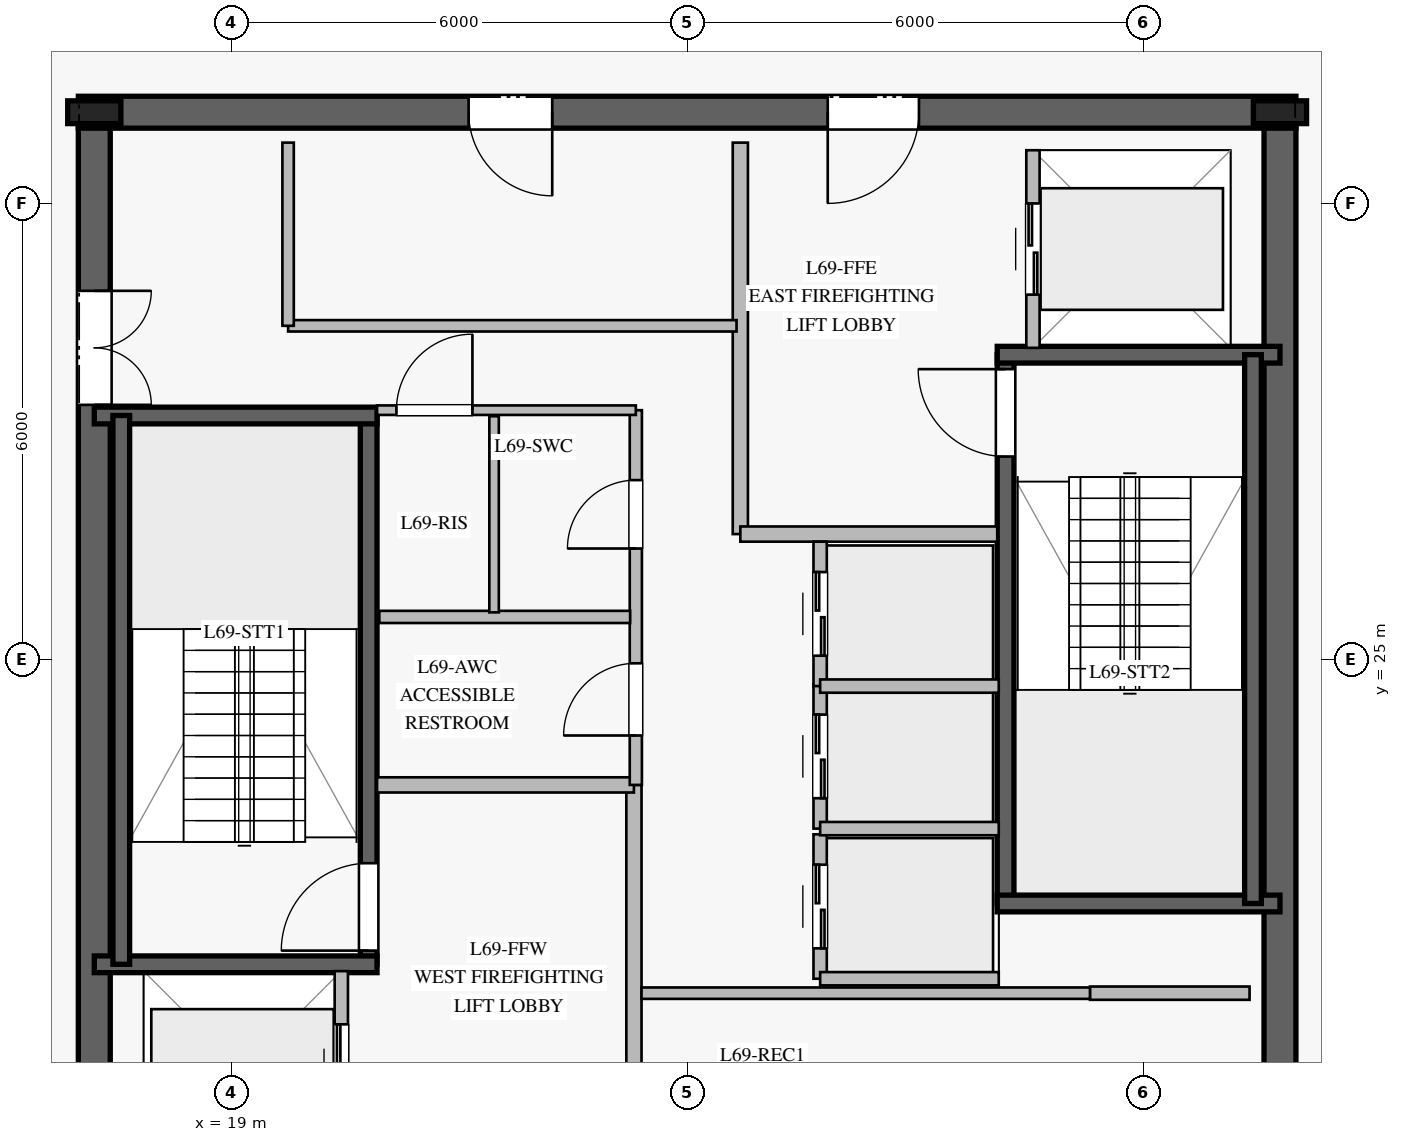
"""IFC4 building model, lengths in metres.
Left out: names, types, materials, properties, quantities, classifications, styles, units other than length and angle.
Written with IfcOpenShell. Run it as: python <this file> out.ifc"""

import sys

from ifc_helpers import new_model, si_unit, direction, frame, frame_2d, origin, origin_2d, place, context, subcontext, project, spatial, rectangle, i_section, extrude, element, fill, save


model = new_model("IFC4")
c1 = context("Model", 3, precision=1e-05, world=origin(), true_north=direction((0.0, 1.0)))
c2 = subcontext(c1, "Body", "Model", "MODEL_VIEW")
j1 = project(units=[si_unit("LENGTHUNIT", "METRE"), si_unit("PLANEANGLEUNIT", "RADIAN")], contexts=[c1])
p1 = place(None, origin())
s1 = spatial("IfcSite", under=j1, at=p1, CompositionType="ELEMENT")
p2 = place(p1, origin())
s2 = spatial("IfcBuilding", under=s1, at=p2, CompositionType="ELEMENT")
p3 = place(p2, frame((0.0, 0.0, 286.2)))
s3 = spatial("IfcBuildingStorey", under=s2, at=p3, CompositionType="ELEMENT", Elevation=286.2)
p4 = place(p3, frame((33.01, 32.2, 0.0), z_axis=(0.0, 0.0, 1.0), x_axis=(-1.0, 0.0, 0.0)))
e1 = element("IfcWall", 1, at=p4, inside=s3, PredefinedType="SHEAR", context=c2, shape_type="SweptSolid", body=[
    extrude(rectangle(XDim=16.02, YDim=0.42, at=frame_2d((8.01, 0.0))), origin(), (0.0, 0.0, 1.0), 3.78),
])
p5 = place(p4, frame((4.96, 0.0, 0.0)))
e2 = element("IfcOpeningElement", 2, at=p5, cuts=e1, PredefinedType="OPENING", context=c2, shape_type="SweptSolid", body=[
    extrude(rectangle(XDim=1.2, YDim=2.25, at=frame_2d((0.6, 1.125))), frame((0.0, 0.22, 0.0), z_axis=(0.0, -1.0, 0.0), x_axis=(1.0, 0.0, 0.0)), (0.0, 0.0, 1.0), 0.44),
])
p6 = place(p4, frame((9.785, 0.0, 0.0)))
e3 = element("IfcOpeningElement", 3, at=p6, cuts=e1, PredefinedType="OPENING", context=c2, shape_type="SweptSolid", body=[
    extrude(rectangle(XDim=1.1, YDim=2.2, at=frame_2d((0.55, 1.1))), frame((0.0, 0.22, 0.0), z_axis=(0.0, -1.0, 0.0), x_axis=(1.0, 0.0, 0.0)), (0.0, 0.0, 1.0), 0.44),
])
p7 = place(p3, frame((17.2, 31.99, 0.0), z_axis=(0.0, 0.0, 1.0), x_axis=(0.0, -1.0, 0.0)))
e4 = element("IfcWall", 4, at=p7, inside=s3, PredefinedType="SHEAR", context=c2, shape_type="SweptSolid", body=[
    extrude(rectangle(XDim=13.98, YDim=0.42, at=frame_2d((6.99, 0.0))), origin(), (0.0, 0.0, 1.0), 3.78),
])
p8 = place(p7, frame((2.14, 0.0, 0.0)))
e5 = element("IfcOpeningElement", 5, at=p8, cuts=e4, PredefinedType="OPENING", context=c2, shape_type="SweptSolid", body=[
    extrude(rectangle(XDim=1.5, YDim=2.2, at=frame_2d((0.75, 1.1))), frame((0.0, 0.22, 0.0), z_axis=(0.0, -1.0, 0.0), x_axis=(1.0, 0.0, 0.0)), (0.0, 0.0, 1.0), 0.44),
])
p9 = place(p3, frame((32.8, 18.01, 0.0), z_axis=(0.0, 0.0, 1.0), x_axis=(0.0, 1.0, 0.0)))
e6 = element("IfcWall", 6, at=p9, inside=s3, PredefinedType="SHEAR", context=c2, shape_type="SweptSolid", body=[
    extrude(rectangle(XDim=13.98, YDim=0.42, at=frame_2d((6.99, 0.0))), origin(), (0.0, 0.0, 1.0), 3.78),
])
for number, where, z_axis, x_axis in (
    (7, (32.8, 32.2, 0.0), (0.0, 0.0, 1.0), (1.0, 0.0, 0.0)),
    (8, (17.2, 32.2, 0.0), (0.0, 0.0, 1.0), (1.0, 0.0, 0.0)),
):
    element("IfcColumn", number, at=place(p3, frame(where, z_axis=z_axis, x_axis=x_axis)), inside=s3, PredefinedType="COLUMN", context=c2, shape_type="SweptSolid", body=[
        extrude(i_section(OverallWidth=0.3, OverallDepth=0.7, WebThickness=0.017, FlangeThickness=0.032, at=origin_2d()), origin(), (0.0, 0.0, 1.0), 4.0),
    ])
p10 = place(p3, frame((20.81, 20.99, 0.0), z_axis=(0.0, 0.0, 1.0), x_axis=(0.0, 1.0, 0.0)))
e9 = element("IfcWall", 9, at=p10, inside=s3, PredefinedType="SOLIDWALL", context=c2, shape_type="SweptSolid", body=[
    extrude(rectangle(XDim=7.22, YDim=0.22, at=frame_2d((3.61, 0.0))), origin(), (0.0, 0.0, 1.0), 3.78),
])
p11 = place(p10, frame((0.18, 0.0, 0.0)))
e10 = element("IfcOpeningElement", 10, at=p11, cuts=e9, PredefinedType="OPENING", context=c2, shape_type="SweptSolid", body=[
    extrude(rectangle(XDim=1.15, YDim=2.2, at=frame_2d((0.575, 1.1))), frame((0.0, 0.12, 0.0), z_axis=(0.0, -1.0, 0.0), x_axis=(1.0, 0.0, 0.0)), (0.0, 0.0, 1.0), 0.24),
])
for number, where, z_axis, x_axis in (
    (11, (17.2, 20.99, 0.0), (0.0, 0.0, 1.0), (1.0, 0.0, 0.0)),
    (12, (17.2, 28.21, 0.0), (0.0, 0.0, 1.0), (1.0, 0.0, 0.0)),
):
    element("IfcWall", number, at=place(p3, frame(where, z_axis=z_axis, x_axis=x_axis)), inside=s3, PredefinedType="SOLIDWALL", context=c2, shape_type="SweptSolid", body=[
        extrude(rectangle(XDim=3.72, YDim=0.22, at=frame_2d((1.86, 0.0))), origin(), (0.0, 0.0, 1.0), 3.78),
    ])
p12 = place(p3, frame((17.555, 28.21, 0.0), z_axis=(0.0, 0.0, 1.0), x_axis=(0.0, -1.0, 0.0)))
e13 = element("IfcWall", 13, at=p12, inside=s3, PredefinedType="SOLIDWALL", context=c2, shape_type="SweptSolid", body=[
    extrude(rectangle(XDim=7.22, YDim=0.22, at=frame_2d((3.61, 0.0))), origin(), (0.0, 0.0, 1.0), 3.78),
])
p13 = place(p3, frame((29.19, 21.79, 0.0), z_axis=(0.0, 0.0, 1.0), x_axis=(0.0, 1.0, 0.0)))
e14 = element("IfcWall", 14, at=p13, inside=s3, PredefinedType="SOLIDWALL", context=c2, shape_type="SweptSolid", body=[
    extrude(rectangle(XDim=7.22, YDim=0.22, at=frame_2d((3.61, 0.0))), origin(), (0.0, 0.0, 1.0), 3.78),
])
p14 = place(p13, frame((5.88, 0.0, 0.0)))
e15 = element("IfcOpeningElement", 15, at=p14, cuts=e14, PredefinedType="OPENING", context=c2, shape_type="SweptSolid", body=[
    extrude(rectangle(XDim=1.15, YDim=2.2, at=frame_2d((0.575, 1.1))), frame((0.0, 0.12, 0.0), z_axis=(0.0, -1.0, 0.0), x_axis=(1.0, 0.0, 0.0)), (0.0, 0.0, 1.0), 0.24),
])
for number, where, z_axis, x_axis in (
    (16, (29.08, 21.79, 0.0), (0.0, 0.0, 1.0), (1.0, 0.0, 0.0)),
    (17, (29.08, 29.01, 0.0), (0.0, 0.0, 1.0), (1.0, 0.0, 0.0)),
):
    element("IfcWall", number, at=place(p3, frame(where, z_axis=z_axis, x_axis=x_axis)), inside=s3, PredefinedType="SOLIDWALL", context=c2, shape_type="SweptSolid", body=[
        extrude(rectangle(XDim=3.72, YDim=0.22, at=frame_2d((1.86, 0.0))), origin(), (0.0, 0.0, 1.0), 3.78),
    ])
p15 = place(p3, frame((32.445, 29.01, 0.0), z_axis=(0.0, 0.0, 1.0), x_axis=(0.0, -1.0, 0.0)))
e18 = element("IfcWall", 18, at=p15, inside=s3, PredefinedType="SOLIDWALL", context=c2, shape_type="SweptSolid", body=[
    extrude(rectangle(XDim=7.22, YDim=0.22, at=frame_2d((3.61, 0.0))), origin(), (0.0, 0.0, 1.0), 3.78),
])
p16 = place(p3, frame((24.3, 18.2, 0.0), z_axis=(0.0, 0.0, 1.0), x_axis=(0.0, 1.0, 0.0)))
e19 = element("IfcWall", 19, at=p16, inside=s3, PredefinedType="PARTITIONING", context=c2, shape_type="SweptSolid", body=[
    extrude(rectangle(XDim=5.15, YDim=0.2, at=frame_2d((2.575, 0.0))), origin(), (0.0, 0.0, 1.0), 3.78),
])
p17 = place(p3, frame((20.92, 23.35, 0.0), z_axis=(0.0, 0.0, 1.0), x_axis=(1.0, 0.0, 0.0)))
e20 = element("IfcWall", 20, at=p17, inside=s3, PredefinedType="PARTITIONING", context=c2, shape_type="SweptSolid", body=[
    extrude(rectangle(XDim=3.38, YDim=0.2, at=frame_2d((1.69, 0.0))), origin(), (0.0, 0.0, 1.0), 3.78),
])
p18 = place(p3, frame((25.7, 26.65, 0.0), z_axis=(0.0, 0.0, 1.0), x_axis=(0.0, 1.0, 0.0)))
e21 = element("IfcWall", 21, at=p18, inside=s3, PredefinedType="PARTITIONING", context=c2, shape_type="SweptSolid", body=[
    extrude(rectangle(XDim=5.15, YDim=0.2, at=frame_2d((2.575, 0.0))), origin(), (0.0, 0.0, 1.0), 3.78),
])
p19 = place(p3, frame((25.7, 26.65, 0.0), z_axis=(0.0, 0.0, 1.0), x_axis=(1.0, 0.0, 0.0)))
e22 = element("IfcWall", 22, at=p19, inside=s3, PredefinedType="PARTITIONING", context=c2, shape_type="SweptSolid", body=[
    extrude(rectangle(XDim=3.38, YDim=0.2, at=frame_2d((1.69, 0.0))), origin(), (0.0, 0.0, 1.0), 3.78),
])
p20 = place(p3, frame((24.325, 23.35, 0.0), z_axis=(0.0, 0.0, 1.0), x_axis=(0.0, 1.0, 0.0)))
e23 = element("IfcWall", 23, at=p20, inside=s3, PredefinedType="PLUMBINGWALL", context=c2, shape_type="SweptSolid", body=[
    extrude(rectangle(XDim=4.93, YDim=0.16, at=frame_2d((2.465, 0.0))), origin(), (0.0, 0.0, 1.0), 3.78),
])
p21 = place(p20, frame((0.65, 0.0, 0.0)))
e24 = element("IfcOpeningElement", 24, at=p21, cuts=e23, PredefinedType="OPENING", context=c2, shape_type="SweptSolid", body=[
    extrude(rectangle(XDim=0.95, YDim=2.1, at=frame_2d((0.475, 1.05))), frame((0.0, 0.09, 0.0), z_axis=(0.0, -1.0, 0.0), x_axis=(1.0, 0.0, 0.0)), (0.0, 0.0, 1.0), 0.18),
])
p22 = place(p20, frame((3.11, 0.0, 0.0)))
e25 = element("IfcOpeningElement", 25, at=p22, cuts=e23, PredefinedType="OPENING", context=c2, shape_type="SweptSolid", body=[
    extrude(rectangle(XDim=0.9, YDim=2.1, at=frame_2d((0.45, 1.05))), frame((0.0, 0.09, 0.0), z_axis=(0.0, -1.0, 0.0), x_axis=(1.0, 0.0, 0.0)), (0.0, 0.0, 1.0), 0.18),
])
p23 = place(p3, frame((20.92, 28.28, 0.0), z_axis=(0.0, 0.0, 1.0), x_axis=(1.0, 0.0, 0.0)))
e26 = element("IfcWall", 26, at=p23, inside=s3, PredefinedType="PARTITIONING", context=c2, shape_type="SweptSolid", body=[
    extrude(rectangle(XDim=3.405, YDim=0.125, at=frame_2d((1.703, 0.0))), origin(), (0.0, 0.0, 1.0), 3.78),
])
p24 = place(p23, frame((0.255, 0.0, 0.0)))
e27 = element("IfcOpeningElement", 27, at=p24, cuts=e26, PredefinedType="OPENING", context=c2, shape_type="SweptSolid", body=[
    extrude(rectangle(XDim=1.0, YDim=2.15, at=frame_2d((0.5, 1.075))), frame((0.0, 0.073, 0.0), z_axis=(0.0, -1.0, 0.0), x_axis=(1.0, 0.0, 0.0)), (0.0, 0.0, 1.0), 0.145),
])
p25 = place(p3, frame((20.95, 25.56, 0.0), z_axis=(0.0, 0.0, 1.0), x_axis=(1.0, 0.0, 0.0)))
e28 = element("IfcWall", 28, at=p25, inside=s3, PredefinedType="PLUMBINGWALL", context=c2, shape_type="SweptSolid", body=[
    extrude(rectangle(XDim=3.3, YDim=0.16, at=frame_2d((1.65, 0.0))), origin(), (0.0, 0.0, 1.0), 3.78),
])
p26 = place(p3, frame((22.46, 25.62, 0.0), z_axis=(0.0, 0.0, 1.0), x_axis=(0.0, 1.0, 0.0)))
e29 = element("IfcWall", 29, at=p26, inside=s3, PredefinedType="PARTITIONING", context=c2, shape_type="SweptSolid", body=[
    extrude(rectangle(XDim=2.58, YDim=0.125, at=frame_2d((1.29, 0.0))), origin(), (0.0, 0.0, 1.0), 3.78),
])
p27 = place(p3, frame((30.3, 20.61, 0.0), z_axis=(0.0, 0.0, 1.0), x_axis=(1.0, 0.0, 0.0)))
e30 = element("IfcWall", 30, at=p27, inside=s3, PredefinedType="PARTITIONING", context=c2, shape_type="SweptSolid", body=[
    extrude(rectangle(XDim=2.1, YDim=0.175, at=frame_2d((1.05, 0.0))), origin(), (0.0, 0.0, 1.0), 3.78),
])
p28 = place(p3, frame((24.4, 20.61, 0.0), z_axis=(0.0, 0.0, 1.0), x_axis=(1.0, 0.0, 0.0)))
e31 = element("IfcWall", 31, at=p28, inside=s3, PredefinedType="PARTITIONING", context=c2, shape_type="SweptSolid", body=[
    extrude(rectangle(XDim=5.9, YDim=0.15, at=frame_2d((2.95, 0.0))), origin(), (0.0, 0.0, 1.0), 3.78),
])
p29 = place(p3, frame((19.75, 29.39, 0.0), z_axis=(0.0, 0.0, 1.0), x_axis=(1.0, 0.0, 0.0)))
e32 = element("IfcWall", 32, at=p29, inside=s3, PredefinedType="PARTITIONING", context=c2, shape_type="SweptSolid", body=[
    extrude(rectangle(XDim=5.9, YDim=0.15, at=frame_2d((2.95, 0.0))), origin(), (0.0, 0.0, 1.0), 3.78),
])
p30 = place(p3, frame((19.75, 29.39, 0.0), z_axis=(0.0, 0.0, 1.0), x_axis=(0.0, 1.0, 0.0)))
e33 = element("IfcWall", 33, at=p30, inside=s3, PredefinedType="PARTITIONING", context=c2, shape_type="SweptSolid", body=[
    extrude(rectangle(XDim=2.41, YDim=0.15, at=frame_2d((1.205, 0.0))), origin(), (0.0, 0.0, 1.0), 3.78),
])
p31 = place(p3, frame((26.75, 20.8, 0.0), z_axis=(0.0, 0.0, 1.0), x_axis=(0.0, 1.0, 0.0)))
e34 = element("IfcWall", 34, at=p31, inside=s3, PredefinedType="PARTITIONING", context=c2, shape_type="SweptSolid", body=[
    extrude(rectangle(XDim=1.9, YDim=0.175, at=frame_2d((0.95, 0.0))), origin(), (0.0, 0.0, 1.0), 3.78),
])
p32 = place(p31, frame((0.4, 0.0, 0.0)))
e35 = element("IfcOpeningElement", 35, at=p32, cuts=e34, PredefinedType="OPENING", context=c2, shape_type="SweptSolid", body=[
    extrude(rectangle(XDim=1.1, YDim=2.2, at=frame_2d((0.55, 1.1))), frame((0.0, 0.098, 0.0), z_axis=(0.0, -1.0, 0.0), x_axis=(1.0, 0.0, 0.0)), (0.0, 0.0, 1.0), 0.195),
])
p33 = place(p3, frame((26.75, 20.8, 0.0), z_axis=(0.0, 0.0, 1.0), x_axis=(1.0, 0.0, 0.0)))
e36 = element("IfcWall", 36, at=p33, inside=s3, PredefinedType="PARTITIONING", context=c2, shape_type="SweptSolid", body=[
    extrude(rectangle(XDim=2.35, YDim=0.175, at=frame_2d((1.175, 0.0))), origin(), (0.0, 0.0, 1.0), 3.78),
])
p34 = place(p3, frame((26.75, 22.775, 0.0), z_axis=(0.0, 0.0, 1.0), x_axis=(0.0, 1.0, 0.0)))
e37 = element("IfcWall", 37, at=p34, inside=s3, PredefinedType="PARTITIONING", context=c2, shape_type="SweptSolid", body=[
    extrude(rectangle(XDim=1.9, YDim=0.175, at=frame_2d((0.95, 0.0))), origin(), (0.0, 0.0, 1.0), 3.78),
])
p35 = place(p34, frame((0.4, 0.0, 0.0)))
e38 = element("IfcOpeningElement", 38, at=p35, cuts=e37, PredefinedType="OPENING", context=c2, shape_type="SweptSolid", body=[
    extrude(rectangle(XDim=1.1, YDim=2.2, at=frame_2d((0.55, 1.1))), frame((0.0, 0.098, 0.0), z_axis=(0.0, -1.0, 0.0), x_axis=(1.0, 0.0, 0.0)), (0.0, 0.0, 1.0), 0.195),
])
p36 = place(p3, frame((26.75, 22.775, 0.0), z_axis=(0.0, 0.0, 1.0), x_axis=(1.0, 0.0, 0.0)))
e39 = element("IfcWall", 39, at=p36, inside=s3, PredefinedType="PARTITIONING", context=c2, shape_type="SweptSolid", body=[
    extrude(rectangle(XDim=2.35, YDim=0.175, at=frame_2d((1.175, 0.0))), origin(), (0.0, 0.0, 1.0), 3.78),
])
p37 = place(p3, frame((26.75, 24.65, 0.0), z_axis=(0.0, 0.0, 1.0), x_axis=(0.0, 1.0, 0.0)))
e40 = element("IfcWall", 40, at=p37, inside=s3, PredefinedType="PARTITIONING", context=c2, shape_type="SweptSolid", body=[
    extrude(rectangle(XDim=1.9, YDim=0.175, at=frame_2d((0.95, 0.0))), origin(), (0.0, 0.0, 1.0), 3.78),
])
p38 = place(p37, frame((0.4, 0.0, 0.0)))
e41 = element("IfcOpeningElement", 41, at=p38, cuts=e40, PredefinedType="OPENING", context=c2, shape_type="SweptSolid", body=[
    extrude(rectangle(XDim=1.1, YDim=2.2, at=frame_2d((0.55, 1.1))), frame((0.0, 0.098, 0.0), z_axis=(0.0, -1.0, 0.0), x_axis=(1.0, 0.0, 0.0)), (0.0, 0.0, 1.0), 0.195),
])
p39 = place(p3, frame((26.75, 24.65, 0.0), z_axis=(0.0, 0.0, 1.0), x_axis=(1.0, 0.0, 0.0)))
e42 = element("IfcWall", 42, at=p39, inside=s3, PredefinedType="PARTITIONING", context=c2, shape_type="SweptSolid", body=[
    extrude(rectangle(XDim=2.35, YDim=0.175, at=frame_2d((1.175, 0.0))), origin(), (0.0, 0.0, 1.0), 3.78),
])
p40 = place(p3, frame((20.45, 18.3, 0.0), z_axis=(0.0, 0.0, 1.0), x_axis=(0.0, 1.0, 0.0)))
e43 = element("IfcWall", 43, at=p40, inside=s3, PredefinedType="PARTITIONING", context=c2, shape_type="SweptSolid", body=[
    extrude(rectangle(XDim=2.6, YDim=0.175, at=frame_2d((1.3, 0.0))), origin(), (0.0, 0.0, 1.0), 3.78),
])
p41 = place(p40, frame((0.7, 0.0, 0.0)))
e44 = element("IfcOpeningElement", 44, at=p41, cuts=e43, PredefinedType="OPENING", context=c2, shape_type="SweptSolid", body=[
    extrude(rectangle(XDim=1.2, YDim=2.2, at=frame_2d((0.6, 1.1))), frame((0.0, 0.098, 0.0), z_axis=(0.0, -1.0, 0.0), x_axis=(1.0, 0.0, 0.0)), (0.0, 0.0, 1.0), 0.195),
])
p42 = place(p3, frame((29.55, 29.1, 0.0), z_axis=(0.0, 0.0, 1.0), x_axis=(0.0, 1.0, 0.0)))
e45 = element("IfcWall", 45, at=p42, inside=s3, PredefinedType="PARTITIONING", context=c2, shape_type="SweptSolid", body=[
    extrude(rectangle(XDim=2.6, YDim=0.175, at=frame_2d((1.3, 0.0))), origin(), (0.0, 0.0, 1.0), 3.78),
])
p43 = place(p42, frame((0.7, 0.0, 0.0)))
e46 = element("IfcOpeningElement", 46, at=p43, cuts=e45, PredefinedType="OPENING", context=c2, shape_type="SweptSolid", body=[
    extrude(rectangle(XDim=1.2, YDim=2.2, at=frame_2d((0.6, 1.1))), frame((0.0, 0.098, 0.0), z_axis=(0.0, -1.0, 0.0), x_axis=(1.0, 0.0, 0.0)), (0.0, 0.0, 1.0), 0.195),
])
p44 = place(p11, origin())
e47 = element("IfcDoor", 47, at=p44, inside=s3, OperationType="SINGLE_SWING_LEFT", PredefinedType="DOOR", context=c2, shape_type="SweptSolid", body=[
    extrude(rectangle(XDim=1.15, YDim=2.2, at=frame_2d((0.575, 1.1))), frame((0.0, 0.025, 0.0), z_axis=(0.0, -1.0, 0.0), x_axis=(1.0, 0.0, 0.0)), (0.0, 0.0, 1.0), 0.05),
])
fill(e10, e47)
p45 = place(p14, origin())
e48 = element("IfcDoor", 48, at=p45, inside=s3, OperationType="SINGLE_SWING_RIGHT", PredefinedType="DOOR", context=c2, shape_type="SweptSolid", body=[
    extrude(rectangle(XDim=1.15, YDim=2.2, at=frame_2d((0.575, 1.1))), frame((0.0, 0.025, 0.0), z_axis=(0.0, -1.0, 0.0), x_axis=(1.0, 0.0, 0.0)), (0.0, 0.0, 1.0), 0.05),
])
fill(e15, e48)
p46 = place(p5, origin())
e49 = element("IfcDoor", 49, at=p46, inside=s3, OperationType="SINGLE_SWING_RIGHT", PredefinedType="DOOR", context=c2, shape_type="SweptSolid", body=[
    extrude(rectangle(XDim=1.2, YDim=2.25, at=frame_2d((0.6, 1.125))), frame((0.0, 0.025, 0.0), z_axis=(0.0, -1.0, 0.0), x_axis=(1.0, 0.0, 0.0)), (0.0, 0.0, 1.0), 0.05),
])
fill(e2, e49)
p47 = place(p8, origin())
e50 = element("IfcDoor", 50, at=p47, inside=s3, OperationType="DOUBLE_DOOR_SINGLE_SWING", PredefinedType="DOOR", context=c2, shape_type="SweptSolid", body=[
    extrude(rectangle(XDim=1.5, YDim=2.2, at=frame_2d((0.75, 1.1))), frame((0.0, 0.025, 0.0), z_axis=(0.0, -1.0, 0.0), x_axis=(1.0, 0.0, 0.0)), (0.0, 0.0, 1.0), 0.05),
])
fill(e5, e50)
p48 = place(p21, origin())
e51 = element("IfcDoor", 51, at=p48, inside=s3, OperationType="SINGLE_SWING_LEFT", PredefinedType="DOOR", context=c2, shape_type="SweptSolid", body=[
    extrude(rectangle(XDim=0.95, YDim=2.1, at=frame_2d((0.475, 1.05))), frame((0.0, 0.025, 0.0), z_axis=(0.0, -1.0, 0.0), x_axis=(1.0, 0.0, 0.0)), (0.0, 0.0, 1.0), 0.05),
])
fill(e24, e51)
p49 = place(p24, origin())
e52 = element("IfcDoor", 52, at=p49, inside=s3, OperationType="SINGLE_SWING_RIGHT", PredefinedType="DOOR", context=c2, shape_type="SweptSolid", body=[
    extrude(rectangle(XDim=1.0, YDim=2.15, at=frame_2d((0.5, 1.075))), frame((0.0, 0.025, 0.0), z_axis=(0.0, -1.0, 0.0), x_axis=(1.0, 0.0, 0.0)), (0.0, 0.0, 1.0), 0.05),
])
fill(e27, e52)
p50 = place(p22, origin())
e53 = element("IfcDoor", 53, at=p50, inside=s3, OperationType="SINGLE_SWING_LEFT", PredefinedType="DOOR", context=c2, shape_type="SweptSolid", body=[
    extrude(rectangle(XDim=0.9, YDim=2.1, at=frame_2d((0.45, 1.05))), frame((0.0, 0.025, 0.0), z_axis=(0.0, -1.0, 0.0), x_axis=(1.0, 0.0, 0.0)), (0.0, 0.0, 1.0), 0.05),
])
fill(e25, e53)
p51 = place(p6, origin())
e54 = element("IfcDoor", 54, at=p51, inside=s3, OperationType="SINGLE_SWING_LEFT", PredefinedType="DOOR", context=c2, shape_type="SweptSolid", body=[
    extrude(rectangle(XDim=1.1, YDim=2.2, at=frame_2d((0.55, 1.1))), frame((0.0, 0.025, 0.0), z_axis=(0.0, -1.0, 0.0), x_axis=(1.0, 0.0, 0.0)), (0.0, 0.0, 1.0), 0.05),
])
fill(e3, e54)
p52 = place(p32, origin())
e55 = element("IfcDoor", 55, at=p52, inside=s3, OperationType="DOUBLE_DOOR_SLIDING", PredefinedType="DOOR", context=c2, shape_type="SweptSolid", body=[
    extrude(rectangle(XDim=1.1, YDim=2.2, at=frame_2d((0.55, 1.1))), frame((0.0, 0.025, 0.0), z_axis=(0.0, -1.0, 0.0), x_axis=(1.0, 0.0, 0.0)), (0.0, 0.0, 1.0), 0.05),
])
fill(e35, e55)
p53 = place(p35, origin())
e56 = element("IfcDoor", 56, at=p53, inside=s3, OperationType="DOUBLE_DOOR_SLIDING", PredefinedType="DOOR", context=c2, shape_type="SweptSolid", body=[
    extrude(rectangle(XDim=1.1, YDim=2.2, at=frame_2d((0.55, 1.1))), frame((0.0, 0.025, 0.0), z_axis=(0.0, -1.0, 0.0), x_axis=(1.0, 0.0, 0.0)), (0.0, 0.0, 1.0), 0.05),
])
fill(e38, e56)
p54 = place(p38, origin())
e57 = element("IfcDoor", 57, at=p54, inside=s3, OperationType="DOUBLE_DOOR_SLIDING", PredefinedType="DOOR", context=c2, shape_type="SweptSolid", body=[
    extrude(rectangle(XDim=1.1, YDim=2.2, at=frame_2d((0.55, 1.1))), frame((0.0, 0.025, 0.0), z_axis=(0.0, -1.0, 0.0), x_axis=(1.0, 0.0, 0.0)), (0.0, 0.0, 1.0), 0.05),
])
fill(e41, e57)
p55 = place(p41, origin())
e58 = element("IfcDoor", 58, at=p55, inside=s3, OperationType="DOUBLE_DOOR_SLIDING", PredefinedType="DOOR", context=c2, shape_type="SweptSolid", body=[
    extrude(rectangle(XDim=1.2, YDim=2.2, at=frame_2d((0.6, 1.1))), frame((0.0, 0.025, 0.0), z_axis=(0.0, -1.0, 0.0), x_axis=(1.0, 0.0, 0.0)), (0.0, 0.0, 1.0), 0.05),
])
fill(e44, e58)
p56 = place(p43, origin())
e59 = element("IfcDoor", 59, at=p56, inside=s3, OperationType="DOUBLE_DOOR_SLIDING", PredefinedType="DOOR", context=c2, shape_type="SweptSolid", body=[
    extrude(rectangle(XDim=1.2, YDim=2.2, at=frame_2d((0.6, 1.1))), frame((0.0, 0.025, 0.0), z_axis=(0.0, -1.0, 0.0), x_axis=(1.0, 0.0, 0.0)), (0.0, 0.0, 1.0), 0.05),
])
fill(e46, e59)
save(model, sys.argv[1])
